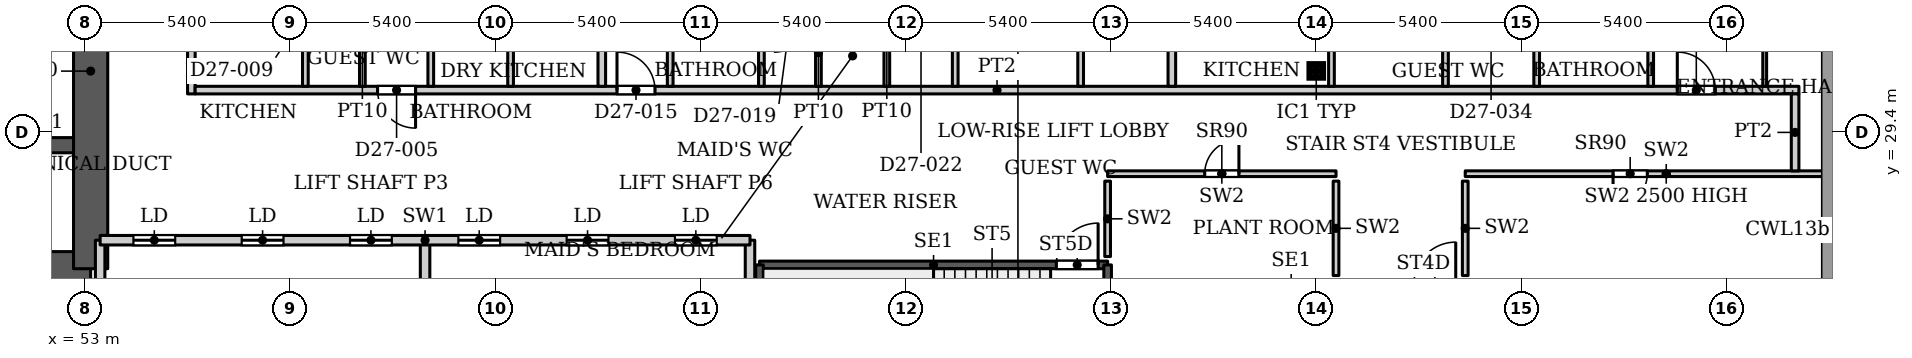
"""IFC4 building model, lengths in metres.
Left out: names, types, materials, properties, quantities, classifications, styles, units other than length and angle.
Written with IfcOpenShell. Run it as: python <this file> out.ifc"""

import sys

from ifc_helpers import new_model, si_unit, direction, frame, frame_2d, origin, origin_2d, place, context, subcontext, project, spatial, rectangle, hollow_rectangle, extrude, source, transform, mapped, element, fill, save


model = new_model("IFC4")
c1 = context("Model", 3, precision=1e-05, world=origin(), true_north=direction((0.0, 1.0)))
c2 = subcontext(c1, "Body", "Model", "MODEL_VIEW")
j1 = project(units=[si_unit("LENGTHUNIT", "METRE"), si_unit("PLANEANGLEUNIT", "RADIAN")], contexts=[c1])
p1 = place(None, origin())
s1 = spatial("IfcSite", under=j1, at=p1, CompositionType="ELEMENT")
p2 = place(p1, origin())
s2 = spatial("IfcBuilding", under=s1, at=p2, CompositionType="ELEMENT")
p3 = place(p2, frame((0.0, 0.0, 121.4)))
s3 = spatial("IfcBuildingStorey", under=s2, at=p3, CompositionType="ELEMENT", Elevation=121.4)
p4 = place(p3, frame((85.4, 31.005, 0.0), z_axis=(0.0, 0.0, 1.0), x_axis=(1.0, 0.0, 0.0)))
e1 = element("IfcColumn", 1, at=p4, inside=s3, PredefinedType="COLUMN", context=c2, shape_type="SweptSolid", body=[
    extrude(hollow_rectangle(XDim=0.356, YDim=0.356, WallThickness=0.016, InnerFilletRadius=0.016, OuterFilletRadius=0.032, at=origin_2d()), origin(), (0.0, 0.0, 1.0), 3.9),
])
p5 = place(p3, frame((34.75, 25.8, 0.0), z_axis=(0.0, 0.0, 1.0), x_axis=(1.0, 0.0, 0.0)))
e2 = element("IfcWall", 2, at=p5, inside=s3, PredefinedType="SHEAR", context=c2, shape_type="SweptSolid", body=[
    extrude(rectangle(XDim=18.4, YDim=0.9, at=frame_2d((9.2, 0.0))), origin(), (0.0, 0.0, 1.0), 3.9),
])
p6 = place(p3, frame((34.75, 29.05, 0.0), z_axis=(0.0, 0.0, 1.0), x_axis=(1.0, 0.0, 0.0)))
e3 = element("IfcWall", 3, at=p6, inside=s3, PredefinedType="SHEAR", context=c2, shape_type="SweptSolid", body=[
    extrude(rectangle(XDim=18.4, YDim=0.4, at=frame_2d((9.2, 0.0))), origin(), (0.0, 0.0, 1.0), 3.9),
])
p7 = place(p6, frame((15.125, 0.0, 0.0)))
e4 = element("IfcOpeningElement", 4, at=p7, cuts=e3, PredefinedType="OPENING", context=c2, shape_type="SweptSolid", body=[
    extrude(rectangle(XDim=1.1, YDim=2.2, at=frame_2d((0.55, 1.1))), frame((0.0, 0.21, 0.0), z_axis=(0.0, -1.0, 0.0), x_axis=(1.0, 0.0, 0.0)), (0.0, 0.0, 1.0), 0.42),
])
p8 = place(p3, frame((53.15, 25.8, 0.0), z_axis=(0.0, 0.0, 1.0), x_axis=(0.0, 1.0, 0.0)))
e5 = element("IfcWall", 5, at=p8, inside=s3, PredefinedType="SHEAR", context=c2, shape_type="SweptSolid", body=[
    extrude(rectangle(XDim=10.4, YDim=0.9, at=frame_2d((5.2, 0.0))), origin(), (0.0, 0.0, 1.0), 3.9),
])
p9 = place(p3, frame((70.75, 25.9, 0.0), z_axis=(0.0, 0.0, 1.0), x_axis=(1.0, 0.0, 0.0)))
e6 = element("IfcWall", 6, at=p9, inside=s3, PredefinedType="SHEAR", context=c2, shape_type="SweptSolid", body=[
    extrude(rectangle(XDim=9.16, YDim=0.2, at=frame_2d((4.58, 0.0))), origin(), (0.0, 0.0, 1.0), 3.9),
])
p10 = place(p9, frame((7.81, 0.0, 0.0)))
e7 = element("IfcOpeningElement", 7, at=p10, cuts=e6, PredefinedType="OPENING", context=c2, shape_type="SweptSolid", body=[
    extrude(rectangle(XDim=1.1, YDim=2.2, at=frame_2d((0.55, 1.1))), frame((0.0, 0.11, 0.0), z_axis=(0.0, -1.0, 0.0), x_axis=(1.0, 0.0, 0.0)), (0.0, 0.0, 1.0), 0.22),
])
for number, where, z_axis, x_axis in (
    (8, (70.75, 22.75, 0.0), (0.0, 0.0, 1.0), (0.0, 1.0, 0.0)),
    (9, (79.91, 22.75, 0.0), (0.0, 0.0, 1.0), (0.0, 1.0, 0.0)),
):
    element("IfcWall", number, at=place(p3, frame(where, z_axis=z_axis, x_axis=x_axis)), inside=s3, PredefinedType="SHEAR", context=c2, shape_type="SweptSolid", body=[
        extrude(rectangle(XDim=3.15, YDim=0.2, at=frame_2d((1.575, 0.0))), origin(), (0.0, 0.0, 1.0), 3.9),
    ])
for number, where, z_axis, x_axis in (
    (10, (53.4, 23.7, 0.0), (0.0, 0.0, 1.0), (0.0, 1.0, 0.0)),
    (11, (61.95, 23.7, 0.0), (0.0, 0.0, 1.0), (0.0, 1.0, 0.0)),
    (12, (70.5, 23.7, 0.0), (0.0, 0.0, 1.0), (0.0, 1.0, 0.0)),
):
    element("IfcWall", number, at=place(p3, frame(where, z_axis=z_axis, x_axis=x_axis)), inside=s3, PredefinedType="PARTITIONING", context=c2, shape_type="SweptSolid", body=[
        extrude(rectangle(XDim=2.85, YDim=0.25, at=frame_2d((1.425, 0.0))), origin(), (0.0, 0.0, 1.0), 3.9),
    ])
p11 = place(p3, frame((53.4, 26.55, 0.0), z_axis=(0.0, 0.0, 1.0), x_axis=(1.0, 0.0, 0.0)))
e13 = element("IfcWall", 13, at=p11, inside=s3, PredefinedType="PARTITIONING", context=c2, shape_type="SweptSolid", body=[
    extrude(rectangle(XDim=17.1, YDim=0.25, at=frame_2d((8.55, 0.0))), origin(), (0.0, 0.0, 1.0), 3.9),
])
p12 = place(p11, frame((0.875, 0.0, 0.0)))
e14 = element("IfcOpeningElement", 14, at=p12, cuts=e13, PredefinedType="OPENING", context=c2, shape_type="SweptSolid", body=[
    extrude(rectangle(XDim=1.1, YDim=2.2, at=frame_2d((0.55, 1.1))), frame((0.0, 0.135, 0.0), z_axis=(0.0, -1.0, 0.0), x_axis=(1.0, 0.0, 0.0)), (0.0, 0.0, 1.0), 0.27),
])
p13 = place(p11, frame((3.725, 0.0, 0.0)))
e15 = element("IfcOpeningElement", 15, at=p13, cuts=e13, PredefinedType="OPENING", context=c2, shape_type="SweptSolid", body=[
    extrude(rectangle(XDim=1.1, YDim=2.2, at=frame_2d((0.55, 1.1))), frame((0.0, 0.135, 0.0), z_axis=(0.0, -1.0, 0.0), x_axis=(1.0, 0.0, 0.0)), (0.0, 0.0, 1.0), 0.27),
])
p14 = place(p11, frame((6.575, 0.0, 0.0)))
e16 = element("IfcOpeningElement", 16, at=p14, cuts=e13, PredefinedType="OPENING", context=c2, shape_type="SweptSolid", body=[
    extrude(rectangle(XDim=1.1, YDim=2.2, at=frame_2d((0.55, 1.1))), frame((0.0, 0.135, 0.0), z_axis=(0.0, -1.0, 0.0), x_axis=(1.0, 0.0, 0.0)), (0.0, 0.0, 1.0), 0.27),
])
p15 = place(p11, frame((9.425, 0.0, 0.0)))
e17 = element("IfcOpeningElement", 17, at=p15, cuts=e13, PredefinedType="OPENING", context=c2, shape_type="SweptSolid", body=[
    extrude(rectangle(XDim=1.1, YDim=2.2, at=frame_2d((0.55, 1.1))), frame((0.0, 0.135, 0.0), z_axis=(0.0, -1.0, 0.0), x_axis=(1.0, 0.0, 0.0)), (0.0, 0.0, 1.0), 0.27),
])
p16 = place(p11, frame((12.275, 0.0, 0.0)))
e18 = element("IfcOpeningElement", 18, at=p16, cuts=e13, PredefinedType="OPENING", context=c2, shape_type="SweptSolid", body=[
    extrude(rectangle(XDim=1.1, YDim=2.2, at=frame_2d((0.55, 1.1))), frame((0.0, 0.135, 0.0), z_axis=(0.0, -1.0, 0.0), x_axis=(1.0, 0.0, 0.0)), (0.0, 0.0, 1.0), 0.27),
])
p17 = place(p11, frame((15.125, 0.0, 0.0)))
e19 = element("IfcOpeningElement", 19, at=p17, cuts=e13, PredefinedType="OPENING", context=c2, shape_type="SweptSolid", body=[
    extrude(rectangle(XDim=1.1, YDim=2.2, at=frame_2d((0.55, 1.1))), frame((0.0, 0.135, 0.0), z_axis=(0.0, -1.0, 0.0), x_axis=(1.0, 0.0, 0.0)), (0.0, 0.0, 1.0), 0.27),
])
p18 = place(p3, frame((79.91, 28.3, 0.0), z_axis=(0.0, 0.0, 1.0), x_axis=(1.0, 0.0, 0.0)))
e20 = element("IfcWall", 20, at=p18, inside=s3, PredefinedType="PARTITIONING", context=c2, shape_type="SweptSolid", body=[
    extrude(rectangle(XDim=6.01, YDim=0.15, at=frame_2d((3.005, 0.0))), origin(), (0.0, 0.0, 1.0), 3.9),
])
p19 = place(p18, frame((2.555, 0.0, 0.0)))
e21 = element("IfcOpeningElement", 21, at=p19, cuts=e20, PredefinedType="OPENING", context=c2, shape_type="SweptSolid", body=[
    extrude(rectangle(XDim=0.9, YDim=2.2, at=frame_2d((0.45, 1.1))), frame((0.0, 0.085, 0.0), z_axis=(0.0, -1.0, 0.0), x_axis=(1.0, 0.0, 0.0)), (0.0, 0.0, 1.0), 0.17),
])
p20 = place(p3, frame((79.91, 26.12, 0.0), z_axis=(0.0, 0.0, 1.0), x_axis=(0.0, 1.0, 0.0)))
e22 = element("IfcWall", 22, at=p20, inside=s3, PredefinedType="PARTITIONING", context=c2, shape_type="SweptSolid", body=[
    extrude(rectangle(XDim=1.985, YDim=0.15, at=frame_2d((0.992, 0.0))), origin(), (0.0, 0.0, 1.0), 3.9),
])
p21 = place(p3, frame((85.92, 25.62, 0.0), z_axis=(0.0, 0.0, 1.0), x_axis=(0.0, 1.0, 0.0)))
e23 = element("IfcWall", 23, at=p21, inside=s3, PredefinedType="PARTITIONING", context=c2, shape_type="SweptSolid", body=[
    extrude(rectangle(XDim=2.485, YDim=0.15, at=frame_2d((1.242, 0.0))), origin(), (0.0, 0.0, 1.0), 3.9),
])
p22 = place(p3, frame((89.32, 28.3, 0.0), z_axis=(0.0, 0.0, 1.0), x_axis=(1.0, 0.0, 0.0)))
e24 = element("IfcWall", 24, at=p22, inside=s3, PredefinedType="PARTITIONING", context=c2, shape_type="SweptSolid", body=[
    extrude(rectangle(XDim=10.578, YDim=0.15, at=frame_2d((5.289, 0.0))), origin(), (0.0, 0.0, 1.0), 2.5),
])
p23 = place(p22, frame((3.89, 0.0, 0.0)))
e25 = element("IfcOpeningElement", 25, at=p23, cuts=e24, PredefinedType="OPENING", context=c2, shape_type="SweptSolid", body=[
    extrude(rectangle(XDim=0.9, YDim=2.2, at=frame_2d((0.45, 1.1))), frame((0.0, 0.085, 0.0), z_axis=(0.0, -1.0, 0.0), x_axis=(1.0, 0.0, 0.0)), (0.0, 0.0, 1.0), 0.17),
])
p24 = place(p3, frame((89.32, 25.62, 0.0), z_axis=(0.0, 0.0, 1.0), x_axis=(0.0, 1.0, 0.0)))
e26 = element("IfcWall", 26, at=p24, inside=s3, PredefinedType="PARTITIONING", context=c2, shape_type="SweptSolid", body=[
    extrude(rectangle(XDim=2.485, YDim=0.15, at=frame_2d((1.242, 0.0))), origin(), (0.0, 0.0, 1.0), 3.9),
])
p25 = place(p3, frame((55.8, 30.4, 0.0), z_axis=(0.0, 0.0, 1.0), x_axis=(0.0, 1.0, 0.0)))
e27 = element("IfcWall", 27, at=p25, inside=s3, PredefinedType="PARTITIONING", context=c2, shape_type="SweptSolid", body=[
    extrude(rectangle(XDim=13.5, YDim=0.2, at=frame_2d((6.75, 0.0))), origin(), (0.0, 0.0, 1.0), 3.6),
])
p26 = place(p3, frame((55.9, 30.5, 0.0), z_axis=(0.0, 0.0, 1.0), x_axis=(1.0, 0.0, 0.0)))
e28 = element("IfcWall", 28, at=p26, inside=s3, PredefinedType="PARTITIONING", context=c2, shape_type="SweptSolid", body=[
    extrude(rectangle(XDim=42.2, YDim=0.2, at=frame_2d((21.1, 0.0))), origin(), (0.0, 0.0, 1.0), 3.6),
])
p27 = place(p26, frame((4.8, 0.0, 0.0)))
e29 = element("IfcOpeningElement", 29, at=p27, cuts=e28, PredefinedType="OPENING", context=c2, shape_type="SweptSolid", body=[
    extrude(rectangle(XDim=1.0, YDim=2.1, at=frame_2d((0.5, 1.05))), frame((0.0, 0.11, 0.0), z_axis=(0.0, -1.0, 0.0), x_axis=(1.0, 0.0, 0.0)), (0.0, 0.0, 1.0), 0.22),
])
p28 = place(p26, frame((11.1, 0.0, 0.0)))
e30 = element("IfcOpeningElement", 30, at=p28, cuts=e28, PredefinedType="OPENING", context=c2, shape_type="SweptSolid", body=[
    extrude(rectangle(XDim=1.0, YDim=2.1, at=frame_2d((0.5, 1.05))), frame((0.0, 0.11, 0.0), z_axis=(0.0, -1.0, 0.0), x_axis=(1.0, 0.0, 0.0)), (0.0, 0.0, 1.0), 0.22),
])
p29 = place(p26, frame((39.0, 0.0, 0.0)))
e31 = element("IfcOpeningElement", 31, at=p29, cuts=e28, PredefinedType="OPENING", context=c2, shape_type="SweptSolid", body=[
    extrude(rectangle(XDim=1.0, YDim=2.1, at=frame_2d((0.5, 1.05))), frame((0.0, 0.11, 0.0), z_axis=(0.0, -1.0, 0.0), x_axis=(1.0, 0.0, 0.0)), (0.0, 0.0, 1.0), 0.22),
])
for number, where, z_axis, x_axis in (
    (32, (58.8, 30.6, 0.0), (0.0, 0.0, 1.0), (0.0, 1.0, 0.0)),
    (33, (60.3, 30.6, 0.0), (0.0, 0.0, 1.0), (0.0, 1.0, 0.0)),
    (34, (62.1, 30.6, 0.0), (0.0, 0.0, 1.0), (0.0, 1.0, 0.0)),
    (35, (64.2, 30.6, 0.0), (0.0, 0.0, 1.0), (0.0, 1.0, 0.0)),
):
    element("IfcWall", number, at=place(p3, frame(where, z_axis=z_axis, x_axis=x_axis)), inside=s3, PredefinedType="PARTITIONING", context=c2, shape_type="SweptSolid", body=[
        extrude(rectangle(XDim=3.025, YDim=0.15, at=frame_2d((1.512, 0.0))), origin(), (0.0, 0.0, 1.0), 3.6),
    ])
p30 = place(p3, frame((66.6, 30.6, 0.0), z_axis=(0.0, 0.0, 1.0), x_axis=(0.0, 1.0, 0.0)))
e36 = element("IfcWall", 36, at=p30, inside=s3, PredefinedType="PARTITIONING", context=c2, shape_type="SweptSolid", body=[
    extrude(rectangle(XDim=13.3, YDim=0.2, at=frame_2d((6.65, 0.0))), origin(), (0.0, 0.0, 1.0), 3.6),
])
for number, where, z_axis, x_axis in (
    (37, (68.4, 30.6, 0.0), (0.0, 0.0, 1.0), (0.0, 1.0, 0.0)),
    (38, (70.8, 30.6, 0.0), (0.0, 0.0, 1.0), (0.0, 1.0, 0.0)),
):
    element("IfcWall", number, at=place(p3, frame(where, z_axis=z_axis, x_axis=x_axis)), inside=s3, PredefinedType="PARTITIONING", context=c2, shape_type="SweptSolid", body=[
        extrude(rectangle(XDim=3.025, YDim=0.15, at=frame_2d((1.512, 0.0))), origin(), (0.0, 0.0, 1.0), 3.6),
    ])
p31 = place(p3, frame((72.3, 30.6, 0.0), z_axis=(0.0, 0.0, 1.0), x_axis=(0.0, 1.0, 0.0)))
e39 = element("IfcWall", 39, at=p31, inside=s3, PredefinedType="PARTITIONING", context=c2, shape_type="SweptSolid", body=[
    extrude(rectangle(XDim=1.775, YDim=0.15, at=frame_2d((0.887, 0.0))), origin(), (0.0, 0.0, 1.0), 3.6),
])
for number, where, z_axis, x_axis in (
    (40, (74.1, 30.6, 0.0), (0.0, 0.0, 1.0), (0.0, 1.0, 0.0)),
    (41, (75.9, 30.6, 0.0), (0.0, 0.0, 1.0), (0.0, 1.0, 0.0)),
    (42, (79.2, 30.6, 0.0), (0.0, 0.0, 1.0), (0.0, 1.0, 0.0)),
):
    element("IfcWall", number, at=place(p3, frame(where, z_axis=z_axis, x_axis=x_axis)), inside=s3, PredefinedType="PARTITIONING", context=c2, shape_type="SweptSolid", body=[
        extrude(rectangle(XDim=3.025, YDim=0.15, at=frame_2d((1.512, 0.0))), origin(), (0.0, 0.0, 1.0), 3.6),
    ])
p32 = place(p3, frame((81.6, 30.6, 0.0), z_axis=(0.0, 0.0, 1.0), x_axis=(0.0, 1.0, 0.0)))
e43 = element("IfcWall", 43, at=p32, inside=s3, PredefinedType="PARTITIONING", context=c2, shape_type="SweptSolid", body=[
    extrude(rectangle(XDim=13.3, YDim=0.2, at=frame_2d((6.65, 0.0))), origin(), (0.0, 0.0, 1.0), 3.6),
])
for number, where, z_axis, x_axis in (
    (44, (85.8, 30.6, 0.0), (0.0, 0.0, 1.0), (0.0, 1.0, 0.0)),
    (45, (88.8, 30.6, 0.0), (0.0, 0.0, 1.0), (0.0, 1.0, 0.0)),
    (46, (91.2, 30.6, 0.0), (0.0, 0.0, 1.0), (0.0, 1.0, 0.0)),
    (47, (94.2, 30.6, 0.0), (0.0, 0.0, 1.0), (0.0, 1.0, 0.0)),
):
    element("IfcWall", number, at=place(p3, frame(where, z_axis=z_axis, x_axis=x_axis)), inside=s3, PredefinedType="PARTITIONING", context=c2, shape_type="SweptSolid", body=[
        extrude(rectangle(XDim=3.025, YDim=0.15, at=frame_2d((1.512, 0.0))), origin(), (0.0, 0.0, 1.0), 3.6),
    ])
p33 = place(p3, frame((97.2, 30.6, 0.0), z_axis=(0.0, 0.0, 1.0), x_axis=(0.0, 1.0, 0.0)))
e48 = element("IfcWall", 48, at=p33, inside=s3, PredefinedType="PARTITIONING", context=c2, shape_type="SweptSolid", body=[
    extrude(rectangle(XDim=3.15, YDim=0.1, at=frame_2d((1.575, 0.0))), origin(), (0.0, 0.0, 1.0), 3.6),
])
p34 = place(p3, frame((98.0, 28.374, 0.0), z_axis=(0.0, 0.0, 1.0), x_axis=(0.0, 1.0, 0.0)))
e49 = element("IfcWall", 49, at=p34, inside=s3, PredefinedType="PARTITIONING", context=c2, shape_type="SweptSolid", body=[
    extrude(rectangle(XDim=2.026, YDim=0.2, at=frame_2d((1.013, 0.0))), origin(), (0.0, 0.0, 1.0), 3.6),
])
m1 = source(origin(), c2, "Body", "SweptSolid", [
    extrude(rectangle(XDim=1.1, YDim=2.2, at=frame_2d((0.55, 1.1))), frame((0.0, 0.025, 0.0), z_axis=(0.0, -1.0, 0.0), x_axis=(1.0, 0.0, 0.0)), (0.0, 0.0, 1.0), 0.05),
])
p35 = place(p12, origin())
e50 = element("IfcDoor", 50, at=p35, inside=s3, OperationType="SLIDING_TO_LEFT", PredefinedType="DOOR", context=c2, shape_type="MappedRepresentation", body=[
    mapped(m1, transform((0.0, 0.0, 0.0), x_axis=(1.0, 0.0, 0.0), y_axis=(0.0, 1.0, 0.0), z_axis=(0.0, 0.0, 1.0), scale=1.0)),
])
fill(e14, e50)
p36 = place(p13, origin())
e51 = element("IfcDoor", 51, at=p36, inside=s3, OperationType="SLIDING_TO_LEFT", PredefinedType="DOOR", context=c2, shape_type="MappedRepresentation", body=[
    mapped(m1, transform((0.0, 0.0, 0.0), x_axis=(1.0, 0.0, 0.0), y_axis=(0.0, 1.0, 0.0), z_axis=(0.0, 0.0, 1.0), scale=1.0)),
])
fill(e15, e51)
p37 = place(p14, origin())
e52 = element("IfcDoor", 52, at=p37, inside=s3, OperationType="SLIDING_TO_LEFT", PredefinedType="DOOR", context=c2, shape_type="MappedRepresentation", body=[
    mapped(m1, transform((0.0, 0.0, 0.0), x_axis=(1.0, 0.0, 0.0), y_axis=(0.0, 1.0, 0.0), z_axis=(0.0, 0.0, 1.0), scale=1.0)),
])
fill(e16, e52)
p38 = place(p15, origin())
e53 = element("IfcDoor", 53, at=p38, inside=s3, OperationType="SLIDING_TO_LEFT", PredefinedType="DOOR", context=c2, shape_type="MappedRepresentation", body=[
    mapped(m1, transform((0.0, 0.0, 0.0), x_axis=(1.0, 0.0, 0.0), y_axis=(0.0, 1.0, 0.0), z_axis=(0.0, 0.0, 1.0), scale=1.0)),
])
fill(e17, e53)
p39 = place(p16, origin())
e54 = element("IfcDoor", 54, at=p39, inside=s3, OperationType="SLIDING_TO_LEFT", PredefinedType="DOOR", context=c2, shape_type="MappedRepresentation", body=[
    mapped(m1, transform((0.0, 0.0, 0.0), x_axis=(1.0, 0.0, 0.0), y_axis=(0.0, 1.0, 0.0), z_axis=(0.0, 0.0, 1.0), scale=1.0)),
])
fill(e18, e54)
p40 = place(p17, origin())
e55 = element("IfcDoor", 55, at=p40, inside=s3, OperationType="SLIDING_TO_LEFT", PredefinedType="DOOR", context=c2, shape_type="MappedRepresentation", body=[
    mapped(m1, transform((0.0, 0.0, 0.0), x_axis=(1.0, 0.0, 0.0), y_axis=(0.0, 1.0, 0.0), z_axis=(0.0, 0.0, 1.0), scale=1.0)),
])
fill(e19, e55)
m2 = source(origin(), c2, "Body", "SweptSolid", [
    extrude(rectangle(XDim=0.9, YDim=2.2, at=frame_2d((0.45, 1.1))), frame((0.0, 0.025, 0.0), z_axis=(0.0, -1.0, 0.0), x_axis=(1.0, 0.0, 0.0)), (0.0, 0.0, 1.0), 0.05),
])
p41 = place(p19, origin())
e56 = element("IfcDoor", 56, at=p41, inside=s3, OperationType="SINGLE_SWING_LEFT", PredefinedType="DOOR", context=c2, shape_type="MappedRepresentation", body=[
    mapped(m2, transform((0.0, 0.0, 0.0), x_axis=(1.0, 0.0, 0.0), y_axis=(0.0, 1.0, 0.0), z_axis=(0.0, 0.0, 1.0), scale=1.0)),
])
fill(e21, e56)
p42 = place(p23, origin())
e57 = element("IfcDoor", 57, at=p42, inside=s3, OperationType="SINGLE_SWING_RIGHT", PredefinedType="DOOR", context=c2, shape_type="MappedRepresentation", body=[
    mapped(m2, transform((0.0, 0.0, 0.0), x_axis=(1.0, 0.0, 0.0), y_axis=(0.0, 1.0, 0.0), z_axis=(0.0, 0.0, 1.0), scale=1.0)),
])
fill(e25, e57)
m3 = source(origin(), c2, "Body", "SweptSolid", [
    extrude(rectangle(XDim=1.1, YDim=2.2, at=frame_2d((0.55, 1.1))), frame((0.0, 0.025, 0.0), z_axis=(0.0, -1.0, 0.0), x_axis=(1.0, 0.0, 0.0)), (0.0, 0.0, 1.0), 0.05),
])
p43 = place(p10, origin())
e58 = element("IfcDoor", 58, at=p43, inside=s3, OperationType="SINGLE_SWING_LEFT", PredefinedType="DOOR", context=c2, shape_type="MappedRepresentation", body=[
    mapped(m3, transform((0.0, 0.0, 0.0), x_axis=(1.0, 0.0, 0.0), y_axis=(0.0, 1.0, 0.0), z_axis=(0.0, 0.0, 1.0), scale=1.0)),
])
fill(e7, e58)
m4 = source(origin(), c2, "Body", "SweptSolid", [
    extrude(rectangle(XDim=1.0, YDim=2.1, at=frame_2d((0.5, 1.05))), frame((0.0, 0.025, 0.0), z_axis=(0.0, -1.0, 0.0), x_axis=(1.0, 0.0, 0.0)), (0.0, 0.0, 1.0), 0.05),
])
p44 = place(p27, origin())
e59 = element("IfcDoor", 59, at=p44, inside=s3, OperationType="SINGLE_SWING_RIGHT", PredefinedType="DOOR", context=c2, shape_type="MappedRepresentation", body=[
    mapped(m4, transform((0.0, 0.0, 0.0), x_axis=(1.0, 0.0, 0.0), y_axis=(0.0, 1.0, 0.0), z_axis=(0.0, 0.0, 1.0), scale=1.0)),
])
fill(e29, e59)
p45 = place(p28, origin())
e60 = element("IfcDoor", 60, at=p45, inside=s3, OperationType="SINGLE_SWING_LEFT", PredefinedType="DOOR", context=c2, shape_type="MappedRepresentation", body=[
    mapped(m4, transform((0.0, 0.0, 0.0), x_axis=(1.0, 0.0, 0.0), y_axis=(0.0, 1.0, 0.0), z_axis=(0.0, 0.0, 1.0), scale=1.0)),
])
fill(e30, e60)
p46 = place(p29, origin())
e61 = element("IfcDoor", 61, at=p46, inside=s3, OperationType="SINGLE_SWING_LEFT", PredefinedType="DOOR", context=c2, shape_type="MappedRepresentation", body=[
    mapped(m4, transform((0.0, 0.0, 0.0), x_axis=(1.0, 0.0, 0.0), y_axis=(0.0, 1.0, 0.0), z_axis=(0.0, 0.0, 1.0), scale=1.0)),
])
fill(e31, e61)
save(model, sys.argv[1])
